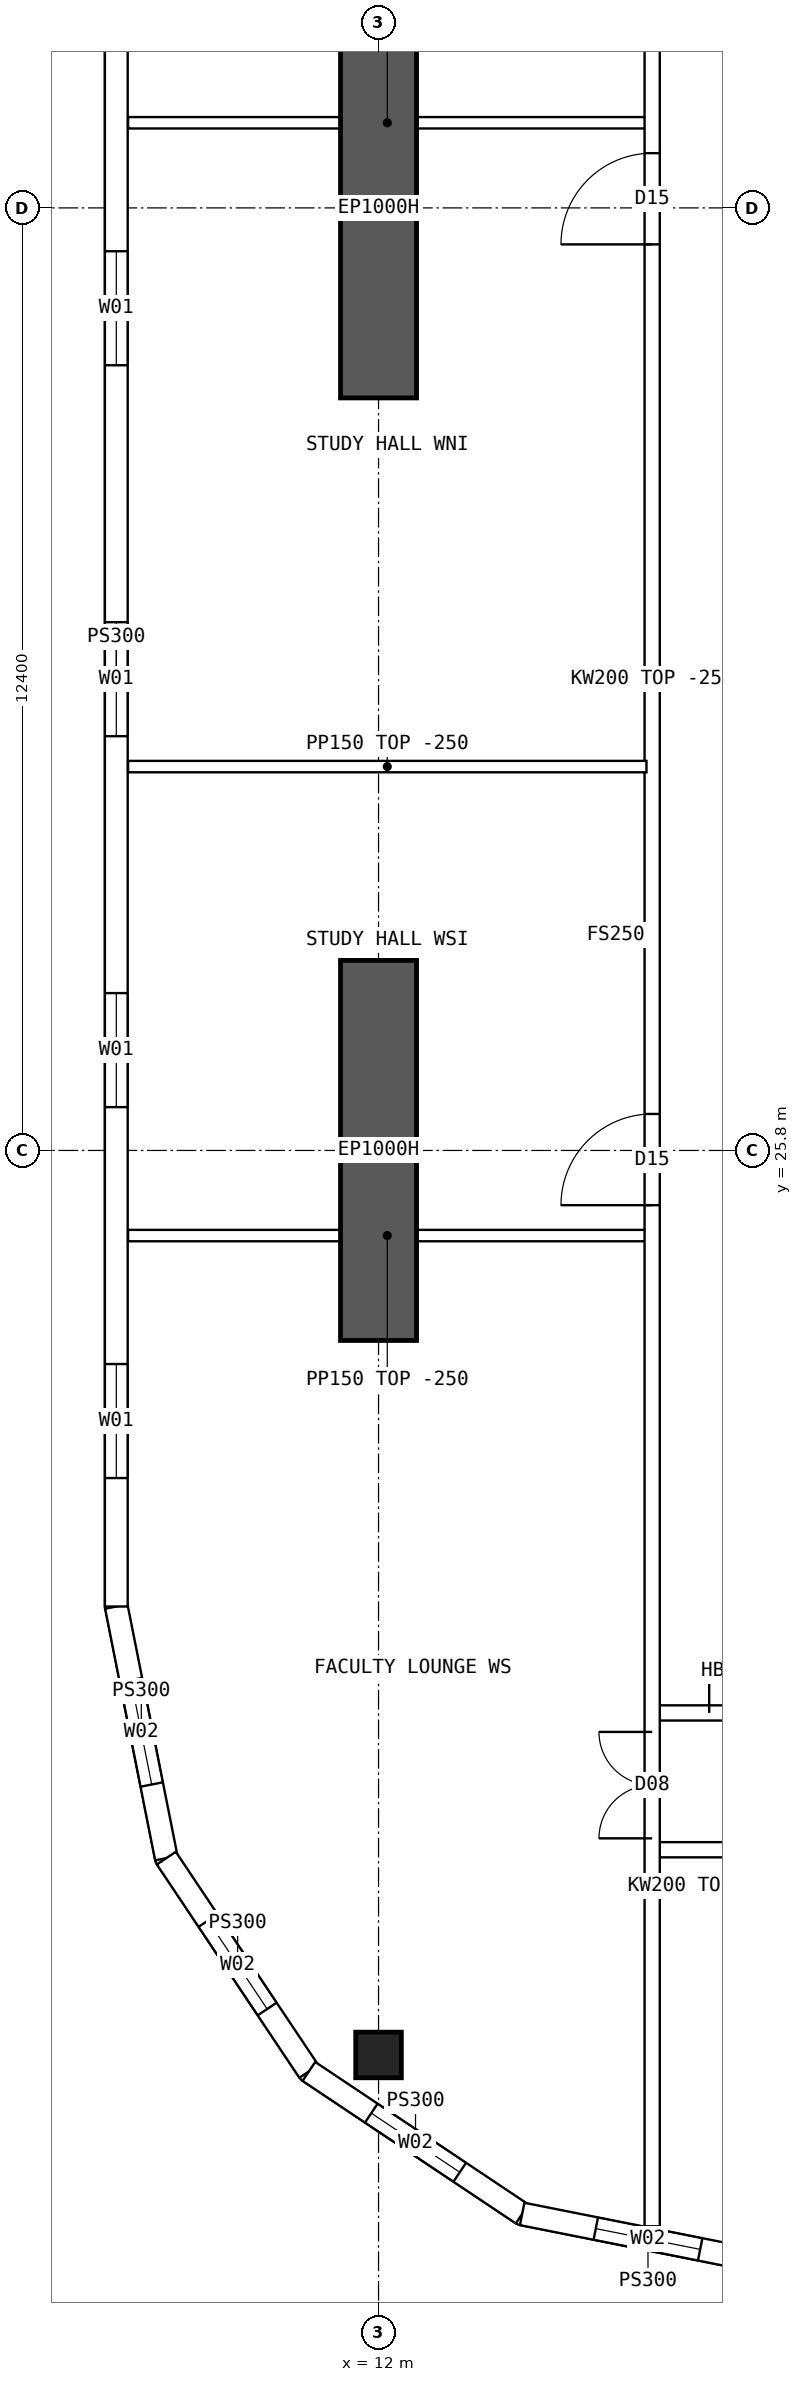
"""IFC4 building model, lengths in metres.
Left out: names, types, materials, properties, quantities, classifications, styles, units other than length and angle.
Written with IfcOpenShell. Run it as: python <this file> out.ifc"""

import sys

from ifc_helpers import new_model, si_unit, direction, frame, frame_2d, origin, origin_2d, place, context, subcontext, project, spatial, polyline, rectangle, hollow_rectangle, outline, extrude, element, fill, save


model = new_model("IFC4")
c1 = context("Model", 3, precision=1e-05, world=origin(), true_north=direction((0.0, 1.0)))
c2 = subcontext(c1, "Body", "Model", "MODEL_VIEW")
j1 = project(units=[si_unit("LENGTHUNIT", "METRE"), si_unit("PLANEANGLEUNIT", "RADIAN")], contexts=[c1])
p1 = place(None, origin())
s1 = spatial("IfcSite", under=j1, at=p1, CompositionType="ELEMENT")
p2 = place(p1, origin())
s2 = spatial("IfcBuilding", under=s1, at=p2, CompositionType="ELEMENT")
p3 = place(p2, frame((0.0, 0.0, 224.05)))
s3 = spatial("IfcBuildingStorey", under=s2, at=p3, CompositionType="ELEMENT", Elevation=224.05)
p4 = place(p3, frame((12.0, 13.9, 0.0), z_axis=(0.0, 0.0, 1.0), x_axis=(1.0, 0.0, 0.0)))
e1 = element("IfcColumn", 1, at=p4, inside=s3, PredefinedType="COLUMN", context=c2, shape_type="SweptSolid", body=[
    extrude(hollow_rectangle(XDim=0.6, YDim=0.6, WallThickness=0.06, at=origin_2d()), origin(), (0.0, 0.0, 1.0), 3.75),
])
for number, where, z_axis, x_axis in (
    (2, (12.0, 23.3, 0.0), (0.0, 0.0, 1.0), (0.0, 1.0, 0.0)),
    (3, (12.0, 35.7, 0.0), (0.0, 0.0, 1.0), (0.0, 1.0, 0.0)),
):
    element("IfcWall", number, at=place(p3, frame(where, z_axis=z_axis, x_axis=x_axis)), inside=s3, PredefinedType="SHEAR", context=c2, shape_type="SweptSolid", body=[
        extrude(rectangle(XDim=5.0, YDim=1.0, at=frame_2d((2.5, 0.0))), origin(), (0.0, 0.0, 1.0), 3.75),
    ])
p5 = place(p3, frame((8.55, 44.2, 0.0), z_axis=(0.0, 0.0, 1.0), x_axis=(0.0, -1.0, 0.0)))
e4 = element("IfcWall", 4, at=p5, inside=s3, PredefinedType="SOLIDWALL", context=c2, shape_type="SweptSolid", body=[
    extrude(outline(polyline([(-0.015, -0.15), (24.415, -0.15), (24.385, 0.15), (0.015, 0.15), (-0.015, -0.15)])), origin(), (0.0, 0.0, 1.0), 3.5),
])
p6 = place(p5, frame((1.69, 0.0, 0.9)))
e5 = element("IfcOpeningElement", 5, at=p6, cuts=e4, PredefinedType="OPENING", context=c2, shape_type="SweptSolid", body=[
    extrude(rectangle(XDim=1.5, YDim=2.0, at=frame_2d((0.75, 1.0))), frame((0.0, 0.16, 0.0), z_axis=(0.0, -1.0, 0.0), x_axis=(1.0, 0.0, 0.0)), (0.0, 0.0, 1.0), 0.32),
])
p7 = place(p5, frame((6.57, 0.0, 0.9)))
e6 = element("IfcOpeningElement", 6, at=p7, cuts=e4, PredefinedType="OPENING", context=c2, shape_type="SweptSolid", body=[
    extrude(rectangle(XDim=1.5, YDim=2.0, at=frame_2d((0.75, 1.0))), frame((0.0, 0.16, 0.0), z_axis=(0.0, -1.0, 0.0), x_axis=(1.0, 0.0, 0.0)), (0.0, 0.0, 1.0), 0.32),
])
p8 = place(p5, frame((11.45, 0.0, 0.9)))
e7 = element("IfcOpeningElement", 7, at=p8, cuts=e4, PredefinedType="OPENING", context=c2, shape_type="SweptSolid", body=[
    extrude(rectangle(XDim=1.5, YDim=2.0, at=frame_2d((0.75, 1.0))), frame((0.0, 0.16, 0.0), z_axis=(0.0, -1.0, 0.0), x_axis=(1.0, 0.0, 0.0)), (0.0, 0.0, 1.0), 0.32),
])
p9 = place(p5, frame((16.33, 0.0, 0.9)))
e8 = element("IfcOpeningElement", 8, at=p9, cuts=e4, PredefinedType="OPENING", context=c2, shape_type="SweptSolid", body=[
    extrude(rectangle(XDim=1.5, YDim=2.0, at=frame_2d((0.75, 1.0))), frame((0.0, 0.16, 0.0), z_axis=(0.0, -1.0, 0.0), x_axis=(1.0, 0.0, 0.0)), (0.0, 0.0, 1.0), 0.32),
])
p10 = place(p5, frame((21.21, 0.0, 0.9)))
e9 = element("IfcOpeningElement", 9, at=p10, cuts=e4, PredefinedType="OPENING", context=c2, shape_type="SweptSolid", body=[
    extrude(rectangle(XDim=1.5, YDim=2.0, at=frame_2d((0.75, 1.0))), frame((0.0, 0.16, 0.0), z_axis=(0.0, -1.0, 0.0), x_axis=(1.0, 0.0, 0.0)), (0.0, 0.0, 1.0), 0.32),
])
p11 = place(p3, frame((8.55, 19.8, 0.0), z_axis=(0.0, 0.0, 1.0), x_axis=(0.19508664885, -0.980786011034, 0.0)))
e10 = element("IfcWall", 10, at=p11, inside=s3, PredefinedType="SOLIDWALL", context=c2, shape_type="SweptSolid", body=[
    extrude(outline(polyline([(-0.015, -0.15), (3.405, -0.15), (3.345, 0.15), (0.015, 0.15), (-0.015, -0.15)])), origin(), (0.0, 0.0, 1.0), 3.5),
])
p12 = place(p11, frame((0.988, 0.0, 0.9)))
e11 = element("IfcOpeningElement", 11, at=p12, cuts=e10, PredefinedType="OPENING", context=c2, shape_type="SweptSolid", body=[
    extrude(rectangle(XDim=1.4, YDim=1.8, at=frame_2d((0.7, 0.9))), frame((0.0, 0.16, 0.0), z_axis=(0.0, -1.0, 0.0), x_axis=(1.0, 0.0, 0.0)), (0.0, 0.0, 1.0), 0.32),
])
p13 = place(p3, frame((9.208, 16.49, 0.0), z_axis=(0.0, 0.0, 1.0), x_axis=(0.555567969291, -0.831471124873, 0.0)))
e12 = element("IfcWall", 12, at=p13, inside=s3, PredefinedType="SOLIDWALL", context=c2, shape_type="SweptSolid", body=[
    extrude(outline(polyline([(-0.03, -0.15), (3.405, -0.15), (3.345, 0.15), (0.03, 0.15), (-0.03, -0.15)])), origin(), (0.0, 0.0, 1.0), 3.5),
])
p14 = place(p13, frame((0.988, 0.0, 0.9)))
e13 = element("IfcOpeningElement", 13, at=p14, cuts=e12, PredefinedType="OPENING", context=c2, shape_type="SweptSolid", body=[
    extrude(rectangle(XDim=1.4, YDim=1.8, at=frame_2d((0.7, 0.9))), frame((0.0, 0.16, 0.0), z_axis=(0.0, -1.0, 0.0), x_axis=(1.0, 0.0, 0.0)), (0.0, 0.0, 1.0), 0.32),
])
p15 = place(p3, frame((11.083, 13.684, 0.0), z_axis=(0.0, 0.0, 1.0), x_axis=(0.831460037396, -0.555584562613, 0.0)))
e14 = element("IfcWall", 14, at=p15, inside=s3, PredefinedType="SOLIDWALL", context=c2, shape_type="SweptSolid", body=[
    extrude(outline(polyline([(-0.03, -0.15), (3.405, -0.15), (3.345, 0.15), (0.03, 0.15), (-0.03, -0.15)])), origin(), (0.0, 0.0, 1.0), 3.5),
])
p16 = place(p15, frame((0.988, 0.0, 0.9)))
e15 = element("IfcOpeningElement", 15, at=p16, cuts=e14, PredefinedType="OPENING", context=c2, shape_type="SweptSolid", body=[
    extrude(rectangle(XDim=1.4, YDim=1.8, at=frame_2d((0.7, 0.9))), frame((0.0, 0.16, 0.0), z_axis=(0.0, -1.0, 0.0), x_axis=(1.0, 0.0, 0.0)), (0.0, 0.0, 1.0), 0.32),
])
p17 = place(p3, frame((13.89, 11.808, 0.0), z_axis=(0.0, 0.0, 1.0), x_axis=(0.98078325777, -0.195100490205, 0.0)))
e16 = element("IfcWall", 16, at=p17, inside=s3, PredefinedType="SOLIDWALL", context=c2, shape_type="SweptSolid", body=[
    extrude(outline(polyline([(-0.03, -0.15), (3.405, -0.15), (3.345, 0.15), (0.03, 0.15), (-0.03, -0.15)])), origin(), (0.0, 0.0, 1.0), 3.5),
])
p18 = place(p17, frame((0.988, 0.0, 0.9)))
e17 = element("IfcOpeningElement", 17, at=p18, cuts=e16, PredefinedType="OPENING", context=c2, shape_type="SweptSolid", body=[
    extrude(rectangle(XDim=1.4, YDim=1.8, at=frame_2d((0.7, 0.9))), frame((0.0, 0.16, 0.0), z_axis=(0.0, -1.0, 0.0), x_axis=(1.0, 0.0, 0.0)), (0.0, 0.0, 1.0), 0.32),
])
p19 = place(p3, frame((15.6, 16.6, 0.0), z_axis=(0.0, 0.0, 1.0), x_axis=(1.0, 0.0, 0.0)))
e18 = element("IfcWall", 18, at=p19, inside=s3, PredefinedType="SOLIDWALL", context=c2, shape_type="SweptSolid", body=[
    extrude(rectangle(XDim=2.05, YDim=0.2, at=frame_2d((1.025, 0.0))), origin(), (0.0, 0.0, 1.0), 3.5),
])
p20 = place(p19, frame((0.95, 0.0, 0.0)))
e19 = element("IfcOpeningElement", 19, at=p20, cuts=e18, PredefinedType="OPENING", context=c2, shape_type="SweptSolid", body=[
    extrude(rectangle(XDim=0.9, YDim=2.1, at=frame_2d((0.45, 1.05))), frame((0.0, 0.11, 0.0), z_axis=(0.0, -1.0, 0.0), x_axis=(1.0, 0.0, 0.0)), (0.0, 0.0, 1.0), 0.22),
])
p21 = place(p3, frame((15.6, 18.4, 0.0), z_axis=(0.0, 0.0, 1.0), x_axis=(1.0, 0.0, 0.0)))
e20 = element("IfcWall", 20, at=p21, inside=s3, PredefinedType="SOLIDWALL", context=c2, shape_type="SweptSolid", body=[
    extrude(rectangle(XDim=2.05, YDim=0.2, at=frame_2d((1.025, 0.0))), origin(), (0.0, 0.0, 1.0), 3.5),
])
p22 = place(p21, frame((0.75, 0.0, 0.0)))
e21 = element("IfcOpeningElement", 21, at=p22, cuts=e20, PredefinedType="OPENING", context=c2, shape_type="SweptSolid", body=[
    extrude(rectangle(XDim=1.2, YDim=2.1, at=frame_2d((0.6, 1.05))), frame((0.0, 0.11, 0.0), z_axis=(0.0, -1.0, 0.0), x_axis=(1.0, 0.0, 0.0)), (0.0, 0.0, 1.0), 0.22),
])
p23 = place(p3, frame((8.705, 30.85, 0.0), z_axis=(0.0, 0.0, 1.0), x_axis=(1.0, 0.0, 0.0)))
e22 = element("IfcWall", 22, at=p23, inside=s3, PredefinedType="PARTITIONING", context=c2, shape_type="SweptSolid", body=[
    extrude(outline(polyline([(0.0, 0.0), (6.82, 0.0), (6.82, 3.5), (3.597, 3.5), (3.595, 3.05), (2.997, 3.05), (2.995, 3.5), (0.0, 3.5), (0.0, 0.0)])), frame((0.0, 0.075, 0.0), z_axis=(0.0, -1.0, 0.0), x_axis=(1.0, 0.0, 0.0)), (0.0, 0.0, 1.0), 0.15),
])
p24 = place(p3, frame((15.6, 11.646, 0.0), z_axis=(0.0, 0.0, 1.0), x_axis=(0.0, 1.0, 0.0)))
e23 = element("IfcWall", 23, at=p24, inside=s3, PredefinedType="SOLIDWALL", context=c2, shape_type="SweptSolid", body=[
    extrude(rectangle(XDim=40.708, YDim=0.2, at=frame_2d((20.354, 0.0))), origin(), (0.0, 0.0, 1.0), 3.5),
])
p25 = place(p24, frame((13.434, 0.0, 0.0)))
e24 = element("IfcOpeningElement", 24, at=p25, cuts=e23, PredefinedType="OPENING", context=c2, shape_type="SweptSolid", body=[
    extrude(rectangle(XDim=1.2, YDim=2.1, at=frame_2d((0.6, 1.05))), frame((0.0, 0.11, 0.0), z_axis=(0.0, -1.0, 0.0), x_axis=(1.0, 0.0, 0.0)), (0.0, 0.0, 1.0), 0.22),
])
p26 = place(p24, frame((26.074, 0.0, 0.0)))
e25 = element("IfcOpeningElement", 25, at=p26, cuts=e23, PredefinedType="OPENING", context=c2, shape_type="SweptSolid", body=[
    extrude(rectangle(XDim=1.2, YDim=2.1, at=frame_2d((0.6, 1.05))), frame((0.0, 0.11, 0.0), z_axis=(0.0, -1.0, 0.0), x_axis=(1.0, 0.0, 0.0)), (0.0, 0.0, 1.0), 0.22),
])
p27 = place(p24, frame((5.104, 0.0, 0.0)))
e26 = element("IfcOpeningElement", 26, at=p27, cuts=e23, PredefinedType="OPENING", context=c2, shape_type="SweptSolid", body=[
    extrude(rectangle(XDim=1.4, YDim=2.1, at=frame_2d((0.7, 1.05))), frame((0.0, 0.11, 0.0), z_axis=(0.0, -1.0, 0.0), x_axis=(1.0, 0.0, 0.0)), (0.0, 0.0, 1.0), 0.22),
])
p28 = place(p24, frame((34.104, 0.0, 0.0)))
e27 = element("IfcOpeningElement", 27, at=p28, cuts=e23, PredefinedType="OPENING", context=c2, shape_type="SweptSolid", body=[
    extrude(rectangle(XDim=1.4, YDim=2.1, at=frame_2d((0.7, 1.05))), frame((0.0, 0.11, 0.0), z_axis=(0.0, -1.0, 0.0), x_axis=(1.0, 0.0, 0.0)), (0.0, 0.0, 1.0), 0.22),
])
for number, where, z_axis, x_axis in (
    (28, (8.705, 24.68, 0.0), (0.0, 0.0, 1.0), (1.0, 0.0, 0.0)),
    (29, (8.705, 39.32, 0.0), (0.0, 0.0, 1.0), (1.0, 0.0, 0.0)),
):
    element("IfcWall", number, at=place(p3, frame(where, z_axis=z_axis, x_axis=x_axis)), inside=s3, PredefinedType="PARTITIONING", context=c2, shape_type="SweptSolid", body=[
        extrude(rectangle(XDim=6.82, YDim=0.15, at=frame_2d((3.41, 0.0))), origin(), (0.0, 0.0, 1.0), 3.5),
    ])
p29 = place(p7, origin())
e30 = element("IfcWindow", 30, at=p29, inside=s3, PartitioningType="SINGLE_PANEL", PredefinedType="WINDOW", context=c2, shape_type="SweptSolid", body=[
    extrude(rectangle(XDim=1.5, YDim=2.0, at=frame_2d((0.75, 1.0))), frame((0.0, 0.03, 0.0), z_axis=(0.0, -1.0, 0.0), x_axis=(1.0, 0.0, 0.0)), (0.0, 0.0, 1.0), 0.06),
])
fill(e6, e30)
p30 = place(p8, origin())
e31 = element("IfcWindow", 31, at=p30, inside=s3, PartitioningType="SINGLE_PANEL", PredefinedType="WINDOW", context=c2, shape_type="SweptSolid", body=[
    extrude(rectangle(XDim=1.5, YDim=2.0, at=frame_2d((0.75, 1.0))), frame((0.0, 0.03, 0.0), z_axis=(0.0, -1.0, 0.0), x_axis=(1.0, 0.0, 0.0)), (0.0, 0.0, 1.0), 0.06),
])
fill(e7, e31)
p31 = place(p9, origin())
e32 = element("IfcWindow", 32, at=p31, inside=s3, PartitioningType="SINGLE_PANEL", PredefinedType="WINDOW", context=c2, shape_type="SweptSolid", body=[
    extrude(rectangle(XDim=1.5, YDim=2.0, at=frame_2d((0.75, 1.0))), frame((0.0, 0.03, 0.0), z_axis=(0.0, -1.0, 0.0), x_axis=(1.0, 0.0, 0.0)), (0.0, 0.0, 1.0), 0.06),
])
fill(e8, e32)
p32 = place(p10, origin())
e33 = element("IfcWindow", 33, at=p32, inside=s3, PartitioningType="SINGLE_PANEL", PredefinedType="WINDOW", context=c2, shape_type="SweptSolid", body=[
    extrude(rectangle(XDim=1.5, YDim=2.0, at=frame_2d((0.75, 1.0))), frame((0.0, 0.03, 0.0), z_axis=(0.0, -1.0, 0.0), x_axis=(1.0, 0.0, 0.0)), (0.0, 0.0, 1.0), 0.06),
])
fill(e9, e33)
p33 = place(p12, origin())
e34 = element("IfcWindow", 34, at=p33, inside=s3, PartitioningType="SINGLE_PANEL", PredefinedType="WINDOW", context=c2, shape_type="SweptSolid", body=[
    extrude(rectangle(XDim=1.4, YDim=1.8, at=frame_2d((0.7, 0.9))), frame((0.0, 0.03, 0.0), z_axis=(0.0, -1.0, 0.0), x_axis=(1.0, 0.0, 0.0)), (0.0, 0.0, 1.0), 0.06),
])
fill(e11, e34)
p34 = place(p14, origin())
e35 = element("IfcWindow", 35, at=p34, inside=s3, PartitioningType="SINGLE_PANEL", PredefinedType="WINDOW", context=c2, shape_type="SweptSolid", body=[
    extrude(rectangle(XDim=1.4, YDim=1.8, at=frame_2d((0.7, 0.9))), frame((0.0, 0.03, 0.0), z_axis=(0.0, -1.0, 0.0), x_axis=(1.0, 0.0, 0.0)), (0.0, 0.0, 1.0), 0.06),
])
fill(e13, e35)
p35 = place(p16, origin())
e36 = element("IfcWindow", 36, at=p35, inside=s3, PartitioningType="SINGLE_PANEL", PredefinedType="WINDOW", context=c2, shape_type="SweptSolid", body=[
    extrude(rectangle(XDim=1.4, YDim=1.8, at=frame_2d((0.7, 0.9))), frame((0.0, 0.03, 0.0), z_axis=(0.0, -1.0, 0.0), x_axis=(1.0, 0.0, 0.0)), (0.0, 0.0, 1.0), 0.06),
])
fill(e15, e36)
p36 = place(p18, origin())
e37 = element("IfcWindow", 37, at=p36, inside=s3, PartitioningType="SINGLE_PANEL", PredefinedType="WINDOW", context=c2, shape_type="SweptSolid", body=[
    extrude(rectangle(XDim=1.4, YDim=1.8, at=frame_2d((0.7, 0.9))), frame((0.0, 0.03, 0.0), z_axis=(0.0, -1.0, 0.0), x_axis=(1.0, 0.0, 0.0)), (0.0, 0.0, 1.0), 0.06),
])
fill(e17, e37)
p37 = place(p22, origin())
e38 = element("IfcDoor", 38, at=p37, inside=s3, OperationType="DOUBLE_DOOR_SINGLE_SWING", PredefinedType="DOOR", context=c2, shape_type="SweptSolid", body=[
    extrude(rectangle(XDim=1.2, YDim=2.1, at=frame_2d((0.6, 1.05))), frame((0.0, 0.025, 0.0), z_axis=(0.0, -1.0, 0.0), x_axis=(1.0, 0.0, 0.0)), (0.0, 0.0, 1.0), 0.05),
])
fill(e21, e38)
p38 = place(p25, origin())
e39 = element("IfcDoor", 39, at=p38, inside=s3, OperationType="SINGLE_SWING_LEFT", PredefinedType="DOOR", context=c2, shape_type="SweptSolid", body=[
    extrude(rectangle(XDim=1.2, YDim=2.1, at=frame_2d((0.6, 1.05))), frame((0.0, 0.025, 0.0), z_axis=(0.0, -1.0, 0.0), x_axis=(1.0, 0.0, 0.0)), (0.0, 0.0, 1.0), 0.05),
])
fill(e24, e39)
p39 = place(p26, origin())
e40 = element("IfcDoor", 40, at=p39, inside=s3, OperationType="SINGLE_SWING_LEFT", PredefinedType="DOOR", context=c2, shape_type="SweptSolid", body=[
    extrude(rectangle(XDim=1.2, YDim=2.1, at=frame_2d((0.6, 1.05))), frame((0.0, 0.025, 0.0), z_axis=(0.0, -1.0, 0.0), x_axis=(1.0, 0.0, 0.0)), (0.0, 0.0, 1.0), 0.05),
])
fill(e25, e40)
p40 = place(p27, origin())
e41 = element("IfcDoor", 41, at=p40, inside=s3, OperationType="DOUBLE_DOOR_SINGLE_SWING", PredefinedType="DOOR", context=c2, shape_type="SweptSolid", body=[
    extrude(rectangle(XDim=1.4, YDim=2.1, at=frame_2d((0.7, 1.05))), frame((0.0, 0.025, 0.0), z_axis=(0.0, -1.0, 0.0), x_axis=(1.0, 0.0, 0.0)), (0.0, 0.0, 1.0), 0.05),
])
fill(e26, e41)
save(model, sys.argv[1])
